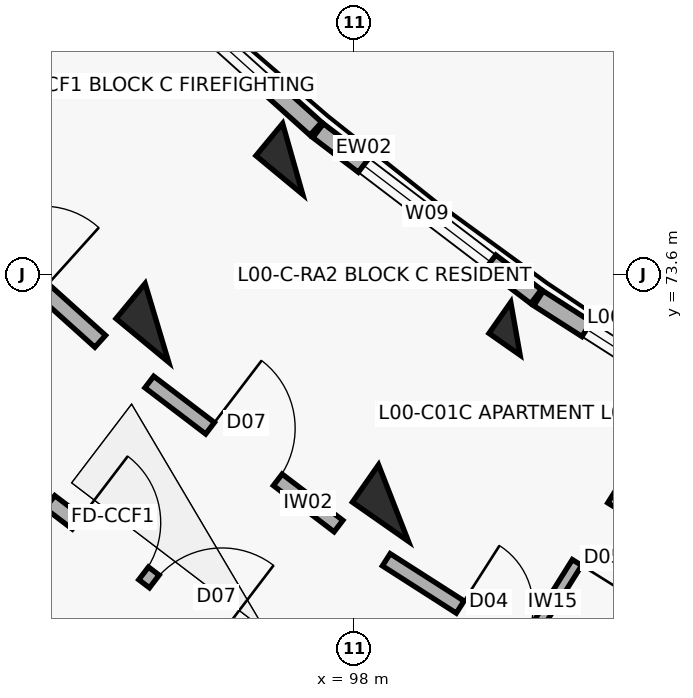
"""IFC4 building model, lengths in metres.
Left out: names, types, materials, properties, quantities, classifications, styles, units other than length and angle.
Written with IfcOpenShell. Run it as: python <this file> out.ifc"""

import sys

from ifc_helpers import new_model, si_unit, direction, frame, frame_2d, origin, origin_2d, place, context, subcontext, project, spatial, rectangle, extrude, element, fill, save


model = new_model("IFC4")
c1 = context("Model", 3, precision=1e-05, world=origin(), true_north=direction((0.0, 1.0)))
c2 = subcontext(c1, "Body", "Model", "MODEL_VIEW")
j1 = project(units=[si_unit("LENGTHUNIT", "METRE"), si_unit("PLANEANGLEUNIT", "RADIAN")], contexts=[c1])
p1 = place(None, origin())
s1 = spatial("IfcSite", under=j1, at=p1, CompositionType="ELEMENT")
p2 = place(p1, origin())
s2 = spatial("IfcBuilding", under=s1, at=p2, CompositionType="ELEMENT")
p3 = place(p2, origin())
s3 = spatial("IfcBuildingStorey", under=s2, at=p3, CompositionType="ELEMENT", Elevation=0.0)
p4 = place(p3, frame((97.195, 75.115, 0.0), z_axis=(0.0, 0.0, 1.0), x_axis=(-0.637961754089, -0.770068049148, 0.0)))
e1 = element("IfcColumn", 1, at=p4, inside=s3, PredefinedType="COLUMN", context=c2, shape_type="SweptSolid", body=[
    extrude(rectangle(XDim=0.55, YDim=0.8, at=origin_2d()), origin(), (0.0, 0.0, 1.0), 4.5),
])
p5 = place(p3, frame((95.409, 72.958, 0.0), z_axis=(0.0, 0.0, 1.0), x_axis=(-0.637961754089, -0.770068049148, 0.0)))
e2 = element("IfcColumn", 2, at=p5, inside=s3, PredefinedType="COLUMN", context=c2, shape_type="SweptSolid", body=[
    extrude(rectangle(XDim=0.6, YDim=0.9, at=origin_2d()), origin(), (0.0, 0.0, 1.0), 4.5),
])
p6 = place(p3, frame((100.126, 72.882, 0.0), z_axis=(0.0, 0.0, 1.0), x_axis=(-0.573004420611, -0.819552276527, 0.0)))
e3 = element("IfcColumn", 3, at=p6, inside=s3, PredefinedType="COLUMN", context=c2, shape_type="SweptSolid", body=[
    extrude(rectangle(XDim=0.5, YDim=0.5, at=origin_2d()), origin(), (0.0, 0.0, 1.0), 4.5),
])
p7 = place(p3, frame((98.522, 70.587, 0.0), z_axis=(0.0, 0.0, 1.0), x_axis=(-0.573004420611, -0.819552276527, 0.0)))
e4 = element("IfcColumn", 4, at=p7, inside=s3, PredefinedType="COLUMN", context=c2, shape_type="SweptSolid", body=[
    extrude(rectangle(XDim=0.6, YDim=0.9, at=origin_2d()), origin(), (0.0, 0.0, 1.0), 4.5),
])
p8 = place(p3, frame((94.82, 77.923, 0.0), z_axis=(0.0, 0.0, 1.0), x_axis=(0.743385092197, -0.668863666751, 0.0)))
e5 = element("IfcWall", 5, at=p8, inside=s3, PredefinedType="SOLIDWALL", context=c2, shape_type="SweptSolid", body=[
    extrude(rectangle(XDim=3.604, YDim=0.23, at=frame_2d((1.802, 0.0))), origin(), (0.0, 0.0, 1.0), 3.45),
])
p9 = place(p8, frame((0.752, 0.0, 0.32)))
e6 = element("IfcOpeningElement", 6, at=p9, cuts=e5, PredefinedType="OPENING", context=c2, shape_type="SweptSolid", body=[
    extrude(rectangle(XDim=2.1, YDim=1.65, at=frame_2d((1.05, 0.825))), frame((0.0, 0.125, 0.0), z_axis=(0.0, -1.0, 0.0), x_axis=(1.0, 0.0, 0.0)), (0.0, 0.0, 1.0), 0.25),
])
p10 = place(p3, frame((97.53, 75.488, 0.0), z_axis=(0.0, 0.0, 1.0), x_axis=(0.795473707045, -0.605988103349, 0.0)))
e7 = element("IfcWall", 7, at=p10, inside=s3, PredefinedType="SOLIDWALL", context=c2, shape_type="SweptSolid", body=[
    extrude(rectangle(XDim=3.604, YDim=0.23, at=frame_2d((1.802, 0.0))), origin(), (0.0, 0.0, 1.0), 3.45),
])
p11 = place(p10, frame((0.752, 0.0, 0.32)))
e8 = element("IfcOpeningElement", 8, at=p11, cuts=e7, PredefinedType="OPENING", context=c2, shape_type="SweptSolid", body=[
    extrude(rectangle(XDim=2.1, YDim=1.65, at=frame_2d((1.05, 0.825))), frame((0.0, 0.125, 0.0), z_axis=(0.0, -1.0, 0.0), x_axis=(1.0, 0.0, 0.0)), (0.0, 0.0, 1.0), 0.25),
])
p12 = place(p3, frame((100.429, 73.281, 0.0), z_axis=(0.0, 0.0, 1.0), x_axis=(0.84225540507, -0.539078688718, 0.0)))
e9 = element("IfcWall", 9, at=p12, inside=s3, PredefinedType="SOLIDWALL", context=c2, shape_type="SweptSolid", body=[
    extrude(rectangle(XDim=3.604, YDim=0.23, at=frame_2d((1.802, 0.0))), origin(), (0.0, 0.0, 1.0), 3.45),
])
p13 = place(p12, frame((0.752, 0.0, 0.32)))
e10 = element("IfcOpeningElement", 10, at=p13, cuts=e9, PredefinedType="OPENING", context=c2, shape_type="SweptSolid", body=[
    extrude(rectangle(XDim=2.1, YDim=1.65, at=frame_2d((1.05, 0.825))), frame((0.0, 0.125, 0.0), z_axis=(0.0, -1.0, 0.0), x_axis=(1.0, 0.0, 0.0)), (0.0, 0.0, 1.0), 0.25),
])
p14 = place(p3, frame((92.337, 74.808, 0.0), z_axis=(0.0, 0.0, 1.0), x_axis=(0.743348465558, -0.668904371904, 0.0)))
e11 = element("IfcWall", 11, at=p14, inside=s3, PredefinedType="SOLIDWALL", context=c2, shape_type="SweptSolid", body=[
    extrude(rectangle(XDim=3.129, YDim=0.21, at=frame_2d((1.564, 0.0))), origin(), (0.0, 0.0, 1.0), 3.34),
])
p15 = place(p14, frame((1.014, 0.0, 0.0)))
e12 = element("IfcOpeningElement", 12, at=p15, cuts=e11, PredefinedType="OPENING", context=c2, shape_type="SweptSolid", body=[
    extrude(rectangle(XDim=1.1, YDim=2.15, at=frame_2d((0.55, 1.075))), frame((0.0, 0.115, 0.0), z_axis=(0.0, -1.0, 0.0), x_axis=(1.0, 0.0, 0.0)), (0.0, 0.0, 1.0), 0.23),
])
p16 = place(p3, frame((94.001, 70.602, 0.0), z_axis=(0.0, 0.0, 1.0), x_axis=(0.795498026433, -0.605956178235, 0.0)))
e13 = element("IfcWall", 13, at=p16, inside=s3, PredefinedType="SOLIDWALL", context=c2, shape_type="SweptSolid", body=[
    extrude(rectangle(XDim=3.296, YDim=0.21, at=frame_2d((1.648, 0.0))), origin(), (0.0, 0.0, 1.0), 3.34),
])
p17 = place(p16, frame((0.45, 0.0, 0.0)))
e14 = element("IfcOpeningElement", 14, at=p17, cuts=e13, PredefinedType="OPENING", context=c2, shape_type="SweptSolid", body=[
    extrude(rectangle(XDim=1.1, YDim=2.15, at=frame_2d((0.55, 1.075))), frame((0.0, 0.115, 0.0), z_axis=(0.0, -1.0, 0.0), x_axis=(1.0, 0.0, 0.0)), (0.0, 0.0, 1.0), 0.23),
])
p18 = place(p16, frame((1.726, 0.0, 0.0)))
e15 = element("IfcOpeningElement", 15, at=p18, cuts=e13, PredefinedType="OPENING", context=c2, shape_type="SweptSolid", body=[
    extrude(rectangle(XDim=1.12, YDim=2.15, at=frame_2d((0.56, 1.075))), frame((0.0, 0.115, 0.0), z_axis=(0.0, -1.0, 0.0), x_axis=(1.0, 0.0, 0.0)), (0.0, 0.0, 1.0), 0.23),
])
p19 = place(p3, frame((95.309, 72.18, 0.0), z_axis=(0.0, 0.0, 1.0), x_axis=(0.795463961918, -0.606000895453, 0.0)))
e16 = element("IfcWall", 16, at=p19, inside=s3, PredefinedType="SOLIDWALL", context=c2, shape_type="SweptSolid", body=[
    extrude(rectangle(XDim=3.129, YDim=0.19, at=frame_2d((1.564, 0.0))), origin(), (0.0, 0.0, 1.0), 3.34),
])
p20 = place(p19, frame((1.004, 0.0, 0.0)))
e17 = element("IfcOpeningElement", 17, at=p20, cuts=e16, PredefinedType="OPENING", context=c2, shape_type="SweptSolid", body=[
    extrude(rectangle(XDim=1.12, YDim=2.15, at=frame_2d((0.56, 1.075))), frame((0.0, 0.105, 0.0), z_axis=(0.0, -1.0, 0.0), x_axis=(1.0, 0.0, 0.0)), (0.0, 0.0, 1.0), 0.21),
])
p21 = place(p3, frame((98.427, 69.841, 0.0), z_axis=(0.0, 0.0, 1.0), x_axis=(0.842280895761, -0.539038860043, 0.0)))
e18 = element("IfcWall", 18, at=p21, inside=s3, PredefinedType="SOLIDWALL", context=c2, shape_type="SweptSolid", body=[
    extrude(rectangle(XDim=3.269, YDim=0.19, at=frame_2d((1.634, 0.0))), origin(), (0.0, 0.0, 1.0), 3.34),
])
p22 = place(p21, frame((1.154, 0.0, 0.0)))
e19 = element("IfcOpeningElement", 19, at=p22, cuts=e18, PredefinedType="OPENING", context=c2, shape_type="SweptSolid", body=[
    extrude(rectangle(XDim=0.96, YDim=2.1, at=frame_2d((0.48, 1.05))), frame((0.0, 0.105, 0.0), z_axis=(0.0, -1.0, 0.0), x_axis=(1.0, 0.0, 0.0)), (0.0, 0.0, 1.0), 0.21),
])
p23 = place(p3, frame((102.044, 71.577, 0.0), z_axis=(0.0, 0.0, 1.0), x_axis=(-0.53015188203, -0.847902696057, 0.0)))
e20 = element("IfcWall", 20, at=p23, inside=s3, PredefinedType="PARTITIONING", context=c2, shape_type="SweptSolid", body=[
    extrude(rectangle(XDim=3.3, YDim=0.145, at=frame_2d((1.65, 0.0))), origin(), (0.0, 0.0, 1.0), 3.34),
])
p24 = place(p23, frame((1.21, 0.0, 0.0)))
e21 = element("IfcOpeningElement", 21, at=p24, cuts=e20, PredefinedType="OPENING", context=c2, shape_type="SweptSolid", body=[
    extrude(rectangle(XDim=0.88, YDim=2.1, at=frame_2d((0.44, 1.05))), frame((0.0, 0.083, 0.0), z_axis=(0.0, -1.0, 0.0), x_axis=(1.0, 0.0, 0.0)), (0.0, 0.0, 1.0), 0.165),
])
p25 = place(p9, origin())
e22 = element("IfcWindow", 22, at=p25, inside=s3, PartitioningType="TRIPLE_PANEL_VERTICAL", PredefinedType="WINDOW", context=c2, shape_type="SweptSolid", body=[
    extrude(rectangle(XDim=2.1, YDim=1.65, at=frame_2d((1.05, 0.825))), frame((0.0, 0.03, 0.0), z_axis=(0.0, -1.0, 0.0), x_axis=(1.0, 0.0, 0.0)), (0.0, 0.0, 1.0), 0.06),
])
fill(e6, e22)
p26 = place(p11, origin())
e23 = element("IfcWindow", 23, at=p26, inside=s3, PartitioningType="TRIPLE_PANEL_VERTICAL", PredefinedType="WINDOW", context=c2, shape_type="SweptSolid", body=[
    extrude(rectangle(XDim=2.1, YDim=1.65, at=frame_2d((1.05, 0.825))), frame((0.0, 0.03, 0.0), z_axis=(0.0, -1.0, 0.0), x_axis=(1.0, 0.0, 0.0)), (0.0, 0.0, 1.0), 0.06),
])
fill(e8, e23)
p27 = place(p13, origin())
e24 = element("IfcWindow", 24, at=p27, inside=s3, PartitioningType="TRIPLE_PANEL_VERTICAL", PredefinedType="WINDOW", context=c2, shape_type="SweptSolid", body=[
    extrude(rectangle(XDim=2.1, YDim=1.65, at=frame_2d((1.05, 0.825))), frame((0.0, 0.03, 0.0), z_axis=(0.0, -1.0, 0.0), x_axis=(1.0, 0.0, 0.0)), (0.0, 0.0, 1.0), 0.06),
])
fill(e10, e24)
p28 = place(p17, origin())
e25 = element("IfcDoor", 25, at=p28, inside=s3, OperationType="SINGLE_SWING_LEFT", PredefinedType="DOOR", context=c2, shape_type="SweptSolid", body=[
    extrude(rectangle(XDim=1.1, YDim=2.15, at=frame_2d((0.55, 1.075))), frame((0.0, 0.025, 0.0), z_axis=(0.0, -1.0, 0.0), x_axis=(1.0, 0.0, 0.0)), (0.0, 0.0, 1.0), 0.05),
])
fill(e14, e25)
p29 = place(p18, origin())
e26 = element("IfcDoor", 26, at=p29, inside=s3, OperationType="SINGLE_SWING_RIGHT", PredefinedType="DOOR", context=c2, shape_type="SweptSolid", body=[
    extrude(rectangle(XDim=1.12, YDim=2.15, at=frame_2d((0.56, 1.075))), frame((0.0, 0.025, 0.0), z_axis=(0.0, -1.0, 0.0), x_axis=(1.0, 0.0, 0.0)), (0.0, 0.0, 1.0), 0.05),
])
fill(e15, e26)
p30 = place(p20, origin())
e27 = element("IfcDoor", 27, at=p30, inside=s3, OperationType="SINGLE_SWING_LEFT", PredefinedType="DOOR", context=c2, shape_type="SweptSolid", body=[
    extrude(rectangle(XDim=1.12, YDim=2.15, at=frame_2d((0.56, 1.075))), frame((0.0, 0.025, 0.0), z_axis=(0.0, -1.0, 0.0), x_axis=(1.0, 0.0, 0.0)), (0.0, 0.0, 1.0), 0.05),
])
fill(e17, e27)
p31 = place(p22, origin())
e28 = element("IfcDoor", 28, at=p31, inside=s3, OperationType="SINGLE_SWING_LEFT", PredefinedType="DOOR", context=c2, shape_type="SweptSolid", body=[
    extrude(rectangle(XDim=0.96, YDim=2.1, at=frame_2d((0.48, 1.05))), frame((0.0, 0.025, 0.0), z_axis=(0.0, -1.0, 0.0), x_axis=(1.0, 0.0, 0.0)), (0.0, 0.0, 1.0), 0.05),
])
fill(e19, e28)
p32 = place(p24, origin())
e29 = element("IfcDoor", 29, at=p32, inside=s3, OperationType="SINGLE_SWING_RIGHT", PredefinedType="DOOR", context=c2, shape_type="SweptSolid", body=[
    extrude(rectangle(XDim=0.88, YDim=2.1, at=frame_2d((0.44, 1.05))), frame((0.0, 0.025, 0.0), z_axis=(0.0, -1.0, 0.0), x_axis=(1.0, 0.0, 0.0)), (0.0, 0.0, 1.0), 0.05),
])
fill(e21, e29)
save(model, sys.argv[1])
